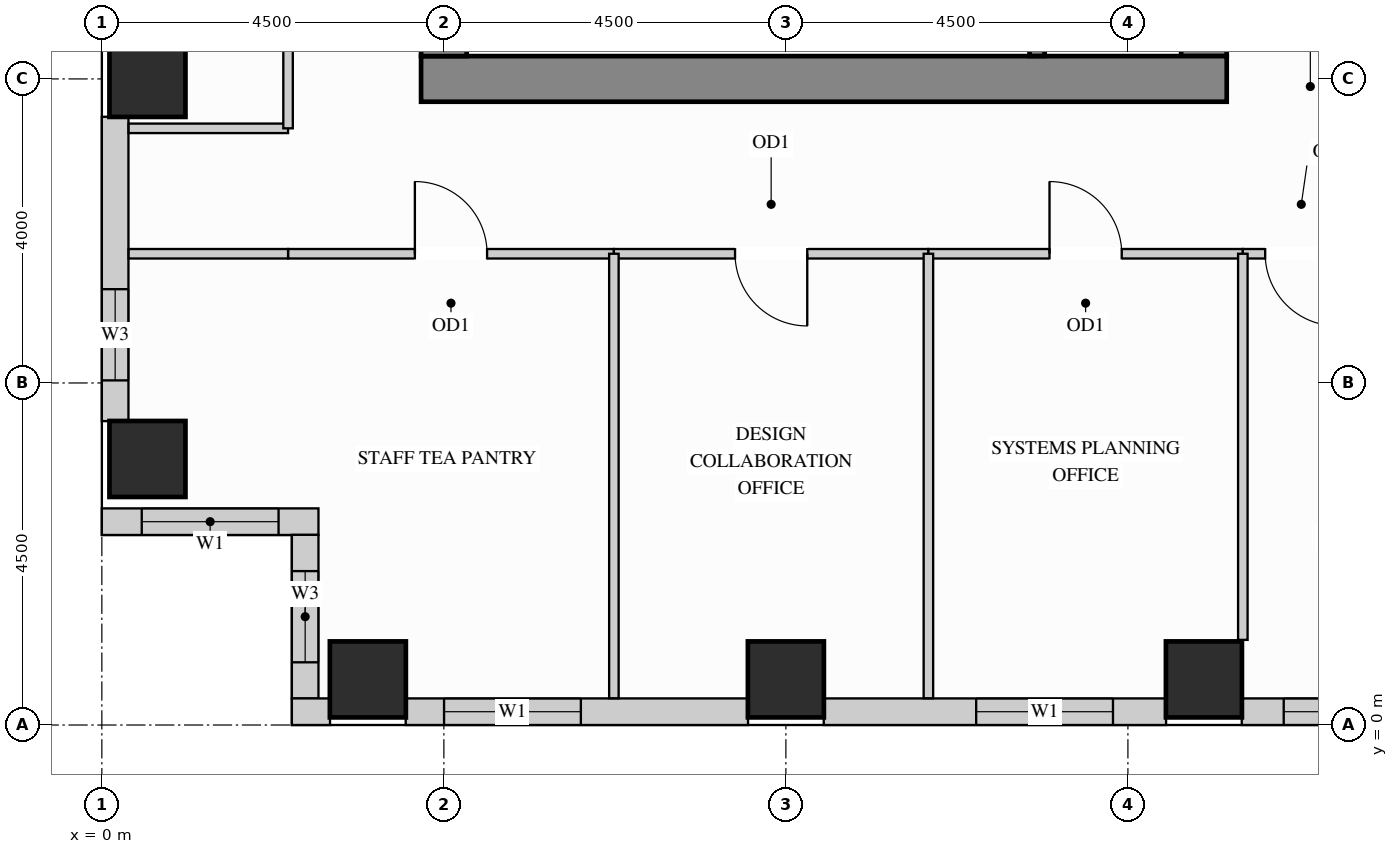
"""IFC4 building model, lengths in metres.
Left out: names, types, materials, properties, quantities, classifications, styles, units other than length and angle.
Written with IfcOpenShell. Run it as: python <this file> out.ifc"""

import sys

from ifc_helpers import new_model, si_unit, direction, frame, frame_2d, origin, origin_2d, place, context, subcontext, project, spatial, rectangle, extrude, source, transform, mapped, element, fill, save


model = new_model("IFC4")
c1 = context("Model", 3, precision=1e-05, world=origin(), true_north=direction((0.0, 1.0)))
c2 = subcontext(c1, "Body", "Model", "MODEL_VIEW")
j1 = project(units=[si_unit("LENGTHUNIT", "METRE"), si_unit("PLANEANGLEUNIT", "RADIAN")], contexts=[c1])
p1 = place(None, origin())
s1 = spatial("IfcSite", under=j1, at=p1, CompositionType="ELEMENT")
p2 = place(p1, origin())
s2 = spatial("IfcBuilding", under=s1, at=p2, CompositionType="ELEMENT")
p3 = place(p2, frame((0.0, 0.0, 204.3)))
s3 = spatial("IfcBuildingStorey", under=s2, at=p3, CompositionType="ELEMENT", Elevation=204.3)
m1 = source(origin(), c2, "Body", "SweptSolid", [
    extrude(rectangle(XDim=1.0, YDim=1.0, at=origin_2d()), origin(), (0.0, 0.0, 1.0), 3.32),
])
for number, where, z_axis, x_axis in (
    (1, (14.5, 0.6, 0.0), (0.0, 0.0, 1.0), (1.0, 0.0, 0.0)),
    (2, (3.5, 0.6, 0.0), (0.0, 0.0, 1.0), (1.0, 0.0, 0.0)),
    (3, (9.0, 0.6, 0.0), (0.0, 0.0, 1.0), (1.0, 0.0, 0.0)),
    (4, (0.6, 3.5, 0.0), (0.0, 0.0, 1.0), (1.0, 0.0, 0.0)),
    (5, (0.6, 8.5, 0.0), (0.0, 0.0, 1.0), (1.0, 0.0, 0.0)),
):
    element("IfcColumn", number, at=place(p3, frame(where, z_axis=z_axis, x_axis=x_axis)), inside=s3, PredefinedType="COLUMN", context=c2, shape_type="MappedRepresentation", body=[
        mapped(m1, transform((0.0, 0.0, 0.0), x_axis=(1.0, 0.0, 0.0), y_axis=(0.0, 1.0, 0.0), z_axis=(0.0, 0.0, 1.0))),
    ])
m2 = source(origin(), c2, "Body", "SweptSolid", [
    extrude(rectangle(XDim=10.02, YDim=0.6, at=frame_2d((5.01, 0.0))), origin(), (0.0, 0.0, 1.0), 3.32),
])
p4 = place(p3, frame((14.5, 8.8, 0.0), z_axis=(0.0, 0.0, 1.0), x_axis=(0.0, 1.0, 0.0)))
e6 = element("IfcWall", 6, at=p4, inside=s3, PredefinedType="SHEAR", context=c2, shape_type="MappedRepresentation", body=[
    mapped(m2, transform((0.0, 0.0, 0.0), x_axis=(1.0, 0.0, 0.0), y_axis=(0.0, 1.0, 0.0), z_axis=(0.0, 0.0, 1.0))),
])
m3 = source(origin(), c2, "Body", "SweptSolid", [
    extrude(rectangle(XDim=10.6, YDim=0.6, at=frame_2d((5.3, 0.0))), origin(), (0.0, 0.0, 1.0), 3.32),
])
p5 = place(p3, frame((4.2, 8.5, 0.0), z_axis=(0.0, 0.0, 1.0), x_axis=(1.0, 0.0, 0.0)))
e7 = element("IfcWall", 7, at=p5, inside=s3, PredefinedType="SHEAR", context=c2, shape_type="MappedRepresentation", body=[
    mapped(m3, transform((0.0, 0.0, 0.0), x_axis=(1.0, 0.0, 0.0), y_axis=(0.0, 1.0, 0.0), z_axis=(0.0, 0.0, 1.0))),
])
m4 = source(origin(), c2, "Body", "SweptSolid", [
    extrude(rectangle(XDim=20.4, YDim=0.6, at=frame_2d((10.2, 0.0))), origin(), (0.0, 0.0, 1.0), 3.32),
])
p6 = place(p3, frame((4.5, 8.8, 0.0), z_axis=(0.0, 0.0, 1.0), x_axis=(0.0, 1.0, 0.0)))
e8 = element("IfcWall", 8, at=p6, inside=s3, PredefinedType="SHEAR", context=c2, shape_type="MappedRepresentation", body=[
    mapped(m4, transform((0.0, 0.0, 0.0), x_axis=(1.0, 0.0, 0.0), y_axis=(0.0, 1.0, 0.0), z_axis=(0.0, 0.0, 1.0))),
])
p7 = place(p3, frame((0.175, 8.002, 0.0), z_axis=(0.0, 0.0, 1.0), x_axis=(0.0, -1.0, 0.0)))
e9 = element("IfcWall", 9, at=p7, inside=s3, PredefinedType="SOLIDWALL", context=c2, shape_type="SweptSolid", body=[
    extrude(rectangle(XDim=4.004, YDim=0.35, at=frame_2d((2.002, 0.0))), origin(), (0.0, 0.0, 1.0), 2.532),
])
p8 = place(p7, frame((2.268, 0.0, 0.78)))
e10 = element("IfcOpeningElement", 10, at=p8, cuts=e9, PredefinedType="OPENING", context=c2, shape_type="SweptSolid", body=[
    extrude(rectangle(XDim=1.2, YDim=1.572, at=frame_2d((0.6, 0.786))), frame((0.0, 0.185, 0.0), z_axis=(0.0, -1.0, 0.0), x_axis=(1.0, 0.0, 0.0)), (0.0, 0.0, 1.0), 0.37),
])
p9 = place(p3, frame((0.0, 2.675, 0.0), z_axis=(0.0, 0.0, 1.0), x_axis=(1.0, 0.0, 0.0)))
e11 = element("IfcWall", 11, at=p9, inside=s3, PredefinedType="SOLIDWALL", context=c2, shape_type="SweptSolid", body=[
    extrude(rectangle(XDim=2.85, YDim=0.35, at=frame_2d((1.425, 0.0))), origin(), (0.0, 0.0, 1.0), 3.305),
])
p10 = place(p9, frame((0.525, 0.0, 0.78)))
e12 = element("IfcOpeningElement", 12, at=p10, cuts=e11, PredefinedType="OPENING", context=c2, shape_type="SweptSolid", body=[
    extrude(rectangle(XDim=1.8, YDim=2.1, at=frame_2d((0.9, 1.05))), frame((0.0, 0.185, 0.0), z_axis=(0.0, -1.0, 0.0), x_axis=(1.0, 0.0, 0.0)), (0.0, 0.0, 1.0), 0.37),
])
p11 = place(p3, frame((2.675, 2.502, 0.0), z_axis=(0.0, 0.0, 1.0), x_axis=(0.0, -1.0, 0.0)))
e13 = element("IfcWall", 13, at=p11, inside=s3, PredefinedType="SOLIDWALL", context=c2, shape_type="SweptSolid", body=[
    extrude(rectangle(XDim=2.154, YDim=0.35, at=frame_2d((1.077, 0.0))), origin(), (0.0, 0.0, 1.0), 3.305),
])
p12 = place(p11, frame((0.477, 0.0, 0.78)))
e14 = element("IfcOpeningElement", 14, at=p12, cuts=e13, PredefinedType="OPENING", context=c2, shape_type="SweptSolid", body=[
    extrude(rectangle(XDim=1.2, YDim=2.1, at=frame_2d((0.6, 1.05))), frame((0.0, 0.185, 0.0), z_axis=(0.0, -1.0, 0.0), x_axis=(1.0, 0.0, 0.0)), (0.0, 0.0, 1.0), 0.37),
])
m5 = source(origin(), c2, "Body", "SweptSolid", [
    extrude(rectangle(XDim=0.502, YDim=0.35, at=frame_2d((0.251, 0.0))), origin(), (0.0, 0.0, 1.0), 3.305),
])
p13 = place(p3, frame((2.5, 0.175, 0.0), z_axis=(0.0, 0.0, 1.0), x_axis=(1.0, 0.0, 0.0)))
e15 = element("IfcWall", 15, at=p13, inside=s3, PredefinedType="SOLIDWALL", context=c2, shape_type="MappedRepresentation", body=[
    mapped(m5, transform((0.0, 0.0, 0.0), x_axis=(1.0, 0.0, 0.0), y_axis=(0.0, 1.0, 0.0), z_axis=(0.0, 0.0, 1.0))),
])
p14 = place(p3, frame((3.998, 0.175, 0.0), z_axis=(0.0, 0.0, 1.0), x_axis=(1.0, 0.0, 0.0)))
e16 = element("IfcWall", 16, at=p14, inside=s3, PredefinedType="SOLIDWALL", context=c2, shape_type="SweptSolid", body=[
    extrude(rectangle(XDim=4.504, YDim=0.35, at=frame_2d((2.252, 0.0))), origin(), (0.0, 0.0, 1.0), 2.532),
])
p15 = place(p14, frame((0.504, 0.0, 0.78)))
e17 = element("IfcOpeningElement", 17, at=p15, cuts=e16, PredefinedType="OPENING", context=c2, shape_type="SweptSolid", body=[
    extrude(rectangle(XDim=1.8, YDim=1.572, at=frame_2d((0.9, 0.786))), frame((0.0, 0.185, 0.0), z_axis=(0.0, -1.0, 0.0), x_axis=(1.0, 0.0, 0.0)), (0.0, 0.0, 1.0), 0.37),
])
p16 = place(p3, frame((9.498, 0.175, 0.0), z_axis=(0.0, 0.0, 1.0), x_axis=(1.0, 0.0, 0.0)))
e18 = element("IfcWall", 18, at=p16, inside=s3, PredefinedType="SOLIDWALL", context=c2, shape_type="SweptSolid", body=[
    extrude(rectangle(XDim=4.504, YDim=0.35, at=frame_2d((2.252, 0.0))), origin(), (0.0, 0.0, 1.0), 2.532),
])
p17 = place(p16, frame((2.006, 0.0, 0.78)))
e19 = element("IfcOpeningElement", 19, at=p17, cuts=e18, PredefinedType="OPENING", context=c2, shape_type="SweptSolid", body=[
    extrude(rectangle(XDim=1.8, YDim=1.572, at=frame_2d((0.9, 0.786))), frame((0.0, 0.185, 0.0), z_axis=(0.0, -1.0, 0.0), x_axis=(1.0, 0.0, 0.0)), (0.0, 0.0, 1.0), 0.37),
])
p18 = place(p3, frame((14.998, 0.175, 0.0), z_axis=(0.0, 0.0, 1.0), x_axis=(1.0, 0.0, 0.0)))
e20 = element("IfcWall", 20, at=p18, inside=s3, PredefinedType="SOLIDWALL", context=c2, shape_type="SweptSolid", body=[
    extrude(rectangle(XDim=3.504, YDim=0.35, at=frame_2d((1.752, 0.0))), origin(), (0.0, 0.0, 1.0), 2.532),
])
p19 = place(p18, frame((0.552, 0.0, 0.78)))
e21 = element("IfcOpeningElement", 21, at=p19, cuts=e20, PredefinedType="OPENING", context=c2, shape_type="SweptSolid", body=[
    extrude(rectangle(XDim=2.4, YDim=1.572, at=frame_2d((1.2, 0.786))), frame((0.0, 0.185, 0.0), z_axis=(0.0, -1.0, 0.0), x_axis=(1.0, 0.0, 0.0)), (0.0, 0.0, 1.0), 0.37),
])
m6 = source(origin(), c2, "Body", "SweptSolid", [
    extrude(rectangle(XDim=2.098, YDim=0.125, at=frame_2d((1.049, 0.0))), origin(), (0.0, 0.0, 1.0), 3.305),
])
p20 = place(p3, frame((0.352, 7.85, 0.0), z_axis=(0.0, 0.0, 1.0), x_axis=(1.0, 0.0, 0.0)))
e22 = element("IfcWall", 22, at=p20, inside=s3, PredefinedType="PARTITIONING", context=c2, shape_type="MappedRepresentation", body=[
    mapped(m6, transform((0.0, 0.0, 0.0), x_axis=(1.0, 0.0, 0.0), y_axis=(0.0, 1.0, 0.0), z_axis=(0.0, 0.0, 1.0))),
])
p21 = place(p3, frame((2.45, 6.2, 0.0), z_axis=(0.0, 0.0, 1.0), x_axis=(1.0, 0.0, 0.0)))
e23 = element("IfcWall", 23, at=p21, inside=s3, PredefinedType="PARTITIONING", context=c2, shape_type="SweptSolid", body=[
    extrude(rectangle(XDim=4.287, YDim=0.125, at=frame_2d((2.144, 0.0))), origin(), (0.0, 0.0, 1.0), 2.768),
])
p22 = place(p21, frame((1.668, 0.0, 0.0)))
e24 = element("IfcOpeningElement", 24, at=p22, cuts=e23, PredefinedType="OPENING", context=c2, shape_type="SweptSolid", body=[
    extrude(rectangle(XDim=0.95, YDim=2.15, at=frame_2d((0.475, 1.075))), frame((0.0, 0.073, 0.0), z_axis=(0.0, -1.0, 0.0), x_axis=(1.0, 0.0, 0.0)), (0.0, 0.0, 1.0), 0.145),
])
p23 = place(p3, frame((6.737, 6.2, 0.0), z_axis=(0.0, 0.0, 1.0), x_axis=(1.0, 0.0, 0.0)))
e25 = element("IfcWall", 25, at=p23, inside=s3, PredefinedType="PARTITIONING", context=c2, shape_type="SweptSolid", body=[
    extrude(rectangle(XDim=4.138, YDim=0.125, at=frame_2d((2.069, 0.0))), origin(), (0.0, 0.0, 1.0), 2.768),
])
p24 = place(p23, frame((1.594, 0.0, 0.0)))
e26 = element("IfcOpeningElement", 26, at=p24, cuts=e25, PredefinedType="OPENING", context=c2, shape_type="SweptSolid", body=[
    extrude(rectangle(XDim=0.95, YDim=2.15, at=frame_2d((0.475, 1.075))), frame((0.0, 0.073, 0.0), z_axis=(0.0, -1.0, 0.0), x_axis=(1.0, 0.0, 0.0)), (0.0, 0.0, 1.0), 0.145),
])
p25 = place(p3, frame((10.875, 6.2, 0.0), z_axis=(0.0, 0.0, 1.0), x_axis=(1.0, 0.0, 0.0)))
e27 = element("IfcWall", 27, at=p25, inside=s3, PredefinedType="PARTITIONING", context=c2, shape_type="SweptSolid", body=[
    extrude(rectangle(XDim=4.137, YDim=0.125, at=frame_2d((2.068, 0.0))), origin(), (0.0, 0.0, 1.0), 2.768),
])
p26 = place(p25, frame((1.594, 0.0, 0.0)))
e28 = element("IfcOpeningElement", 28, at=p26, cuts=e27, PredefinedType="OPENING", context=c2, shape_type="SweptSolid", body=[
    extrude(rectangle(XDim=0.95, YDim=2.15, at=frame_2d((0.475, 1.075))), frame((0.0, 0.073, 0.0), z_axis=(0.0, -1.0, 0.0), x_axis=(1.0, 0.0, 0.0)), (0.0, 0.0, 1.0), 0.145),
])
p27 = place(p3, frame((15.012, 6.2, 0.0), z_axis=(0.0, 0.0, 1.0), x_axis=(1.0, 0.0, 0.0)))
e29 = element("IfcWall", 29, at=p27, inside=s3, PredefinedType="PARTITIONING", context=c2, shape_type="SweptSolid", body=[
    extrude(rectangle(XDim=1.538, YDim=0.125, at=frame_2d((0.769, 0.0))), origin(), (0.0, 0.0, 1.0), 2.768),
])
p28 = place(p27, frame((0.294, 0.0, 0.0)))
e30 = element("IfcOpeningElement", 30, at=p28, cuts=e29, PredefinedType="OPENING", context=c2, shape_type="SweptSolid", body=[
    extrude(rectangle(XDim=0.95, YDim=2.15, at=frame_2d((0.475, 1.075))), frame((0.0, 0.073, 0.0), z_axis=(0.0, -1.0, 0.0), x_axis=(1.0, 0.0, 0.0)), (0.0, 0.0, 1.0), 0.145),
])
m7 = source(origin(), c2, "Body", "SweptSolid", [
    extrude(rectangle(XDim=2.098, YDim=0.125, at=frame_2d((1.049, 0.0))), origin(), (0.0, 0.0, 1.0), 2.768),
])
p29 = place(p3, frame((0.352, 6.2, 0.0), z_axis=(0.0, 0.0, 1.0), x_axis=(1.0, 0.0, 0.0)))
e31 = element("IfcWall", 31, at=p29, inside=s3, PredefinedType="PARTITIONING", context=c2, shape_type="MappedRepresentation", body=[
    mapped(m7, transform((0.0, 0.0, 0.0), x_axis=(1.0, 0.0, 0.0), y_axis=(0.0, 1.0, 0.0), z_axis=(0.0, 0.0, 1.0))),
])
m8 = source(origin(), c2, "Body", "SweptSolid", [
    extrude(rectangle(XDim=5.848, YDim=0.125, at=frame_2d((2.924, 0.0))), origin(), (0.0, 0.0, 1.0), 3.305),
])
for number, where, z_axis, x_axis in (
    (32, (6.737, 0.352, 0.0), (0.0, 0.0, 1.0), (0.0, 1.0, 0.0)),
    (33, (10.875, 0.352, 0.0), (0.0, 0.0, 1.0), (0.0, 1.0, 0.0)),
):
    element("IfcWall", number, at=place(p3, frame(where, z_axis=z_axis, x_axis=x_axis)), inside=s3, PredefinedType="PARTITIONING", context=c2, shape_type="MappedRepresentation", body=[
        mapped(m8, transform((0.0, 0.0, 0.0), x_axis=(1.0, 0.0, 0.0), y_axis=(0.0, 1.0, 0.0), z_axis=(0.0, 0.0, 1.0))),
    ])
m9 = source(origin(), c2, "Body", "SweptSolid", [
    extrude(rectangle(XDim=5.08, YDim=0.125, at=frame_2d((2.54, 0.0))), origin(), (0.0, 0.0, 1.0), 3.305),
])
p30 = place(p3, frame((15.012, 1.12, 0.0), z_axis=(0.0, 0.0, 1.0), x_axis=(0.0, 1.0, 0.0)))
e34 = element("IfcWall", 34, at=p30, inside=s3, PredefinedType="PARTITIONING", context=c2, shape_type="MappedRepresentation", body=[
    mapped(m9, transform((0.0, 0.0, 0.0), x_axis=(1.0, 0.0, 0.0), y_axis=(0.0, 1.0, 0.0), z_axis=(0.0, 0.0, 1.0))),
])
p31 = place(p3, frame((2.45, 7.85, 0.0), z_axis=(0.0, 0.0, 1.0), x_axis=(0.0, 1.0, 0.0)))
e35 = element("IfcWall", 35, at=p31, inside=s3, PredefinedType="PARTITIONING", context=c2, shape_type="SweptSolid", body=[
    extrude(rectangle(XDim=7.25, YDim=0.125, at=frame_2d((3.625, 0.0))), origin(), (0.0, 0.0, 1.0), 3.305),
])
p32 = place(p31, frame((3.15, 0.0, 0.0)))
e36 = element("IfcOpeningElement", 36, at=p32, cuts=e35, PredefinedType="OPENING", context=c2, shape_type="SweptSolid", body=[
    extrude(rectangle(XDim=0.95, YDim=2.15, at=frame_2d((0.475, 1.075))), frame((0.0, 0.073, 0.0), z_axis=(0.0, -1.0, 0.0), x_axis=(1.0, 0.0, 0.0)), (0.0, 0.0, 1.0), 0.145),
])
m10 = source(origin(), c2, "Body", "SweptSolid", [
    extrude(rectangle(XDim=3.753, YDim=0.2, at=frame_2d((1.876, 0.0))), origin(), (0.0, 0.0, 1.0), 3.32),
])
p33 = place(p3, frame((12.305, 8.802, 0.0), z_axis=(0.0, 0.0, 1.0), x_axis=(0.0, 1.0, 0.0)))
e37 = element("IfcWall", 37, at=p33, inside=s3, PredefinedType="SHEAR", context=c2, shape_type="MappedRepresentation", body=[
    mapped(m10, transform((0.0, 0.0, 0.0), x_axis=(1.0, 0.0, 0.0), y_axis=(0.0, 1.0, 0.0), z_axis=(0.0, 0.0, 1.0))),
])
m11 = source(origin(), c2, "Body", "SweptSolid", [
    extrude(rectangle(XDim=0.95, YDim=2.15, at=frame_2d((0.475, 1.075))), frame((0.0, 0.025, 0.0), z_axis=(0.0, -1.0, 0.0), x_axis=(1.0, 0.0, 0.0)), (0.0, 0.0, 1.0), 0.05),
])
p34 = place(p22, origin())
e38 = element("IfcDoor", 38, at=p34, inside=s3, OperationType="SINGLE_SWING_LEFT", PredefinedType="DOOR", context=c2, shape_type="MappedRepresentation", body=[
    mapped(m11, transform((0.0, 0.0, 0.0), x_axis=(1.0, 0.0, 0.0), y_axis=(0.0, 1.0, 0.0), z_axis=(0.0, 0.0, 1.0))),
])
fill(e24, e38)
p35 = place(p24, origin())
e39 = element("IfcDoor", 39, at=p35, inside=s3, OperationType="SINGLE_SWING_RIGHT", PredefinedType="DOOR", context=c2, shape_type="MappedRepresentation", body=[
    mapped(m11, transform((0.0, 0.0, 0.0), x_axis=(1.0, 0.0, 0.0), y_axis=(0.0, 1.0, 0.0), z_axis=(0.0, 0.0, 1.0))),
])
fill(e26, e39)
p36 = place(p26, origin())
e40 = element("IfcDoor", 40, at=p36, inside=s3, OperationType="SINGLE_SWING_LEFT", PredefinedType="DOOR", context=c2, shape_type="MappedRepresentation", body=[
    mapped(m11, transform((0.0, 0.0, 0.0), x_axis=(1.0, 0.0, 0.0), y_axis=(0.0, 1.0, 0.0), z_axis=(0.0, 0.0, 1.0))),
])
fill(e28, e40)
p37 = place(p28, origin())
e41 = element("IfcDoor", 41, at=p37, inside=s3, OperationType="SINGLE_SWING_RIGHT", PredefinedType="DOOR", context=c2, shape_type="MappedRepresentation", body=[
    mapped(m11, transform((0.0, 0.0, 0.0), x_axis=(1.0, 0.0, 0.0), y_axis=(0.0, 1.0, 0.0), z_axis=(0.0, 0.0, 1.0))),
])
fill(e30, e41)
m12 = source(origin(), c2, "Body", "SweptSolid", [
    extrude(rectangle(XDim=1.8, YDim=2.1, at=frame_2d((0.9, 1.05))), frame((0.0, 0.03, 0.0), z_axis=(0.0, -1.0, 0.0), x_axis=(1.0, 0.0, 0.0)), (0.0, 0.0, 1.0), 0.06),
])
p38 = place(p10, origin())
e42 = element("IfcWindow", 42, at=p38, inside=s3, PartitioningType="SINGLE_PANEL", PredefinedType="WINDOW", context=c2, shape_type="MappedRepresentation", body=[
    mapped(m12, transform((0.0, 0.0, 0.0), x_axis=(1.0, 0.0, 0.0), y_axis=(0.0, 1.0, 0.0), z_axis=(0.0, 0.0, 1.0))),
])
fill(e12, e42)
m13 = source(origin(), c2, "Body", "SweptSolid", [
    extrude(rectangle(XDim=1.8, YDim=1.572, at=frame_2d((0.9, 0.786))), frame((0.0, 0.03, 0.0), z_axis=(0.0, -1.0, 0.0), x_axis=(1.0, 0.0, 0.0)), (0.0, 0.0, 1.0), 0.06),
])
p39 = place(p15, origin())
e43 = element("IfcWindow", 43, at=p39, inside=s3, PartitioningType="SINGLE_PANEL", PredefinedType="WINDOW", context=c2, shape_type="MappedRepresentation", body=[
    mapped(m13, transform((0.0, 0.0, 0.0), x_axis=(1.0, 0.0, 0.0), y_axis=(0.0, 1.0, 0.0), z_axis=(0.0, 0.0, 1.0))),
])
fill(e17, e43)
p40 = place(p17, origin())
e44 = element("IfcWindow", 44, at=p40, inside=s3, PartitioningType="SINGLE_PANEL", PredefinedType="WINDOW", context=c2, shape_type="MappedRepresentation", body=[
    mapped(m13, transform((0.0, 0.0, 0.0), x_axis=(1.0, 0.0, 0.0), y_axis=(0.0, 1.0, 0.0), z_axis=(0.0, 0.0, 1.0))),
])
fill(e19, e44)
m14 = source(origin(), c2, "Body", "SweptSolid", [
    extrude(rectangle(XDim=2.4, YDim=1.572, at=frame_2d((1.2, 0.786))), frame((0.0, 0.03, 0.0), z_axis=(0.0, -1.0, 0.0), x_axis=(1.0, 0.0, 0.0)), (0.0, 0.0, 1.0), 0.06),
])
p41 = place(p19, origin())
e45 = element("IfcWindow", 45, at=p41, inside=s3, PartitioningType="SINGLE_PANEL", PredefinedType="WINDOW", context=c2, shape_type="MappedRepresentation", body=[
    mapped(m14, transform((0.0, 0.0, 0.0), x_axis=(1.0, 0.0, 0.0), y_axis=(0.0, 1.0, 0.0), z_axis=(0.0, 0.0, 1.0))),
])
fill(e21, e45)
m15 = source(origin(), c2, "Body", "SweptSolid", [
    extrude(rectangle(XDim=1.2, YDim=1.572, at=frame_2d((0.6, 0.786))), frame((0.0, 0.03, 0.0), z_axis=(0.0, -1.0, 0.0), x_axis=(1.0, 0.0, 0.0)), (0.0, 0.0, 1.0), 0.06),
])
p42 = place(p8, origin())
e46 = element("IfcWindow", 46, at=p42, inside=s3, PartitioningType="SINGLE_PANEL", PredefinedType="WINDOW", context=c2, shape_type="MappedRepresentation", body=[
    mapped(m15, transform((0.0, 0.0, 0.0), x_axis=(1.0, 0.0, 0.0), y_axis=(0.0, 1.0, 0.0), z_axis=(0.0, 0.0, 1.0))),
])
fill(e10, e46)
m16 = source(origin(), c2, "Body", "SweptSolid", [
    extrude(rectangle(XDim=1.2, YDim=2.1, at=frame_2d((0.6, 1.05))), frame((0.0, 0.03, 0.0), z_axis=(0.0, -1.0, 0.0), x_axis=(1.0, 0.0, 0.0)), (0.0, 0.0, 1.0), 0.06),
])
p43 = place(p12, origin())
e47 = element("IfcWindow", 47, at=p43, inside=s3, PartitioningType="SINGLE_PANEL", PredefinedType="WINDOW", context=c2, shape_type="MappedRepresentation", body=[
    mapped(m16, transform((0.0, 0.0, 0.0), x_axis=(1.0, 0.0, 0.0), y_axis=(0.0, 1.0, 0.0), z_axis=(0.0, 0.0, 1.0))),
])
fill(e14, e47)
save(model, sys.argv[1])
